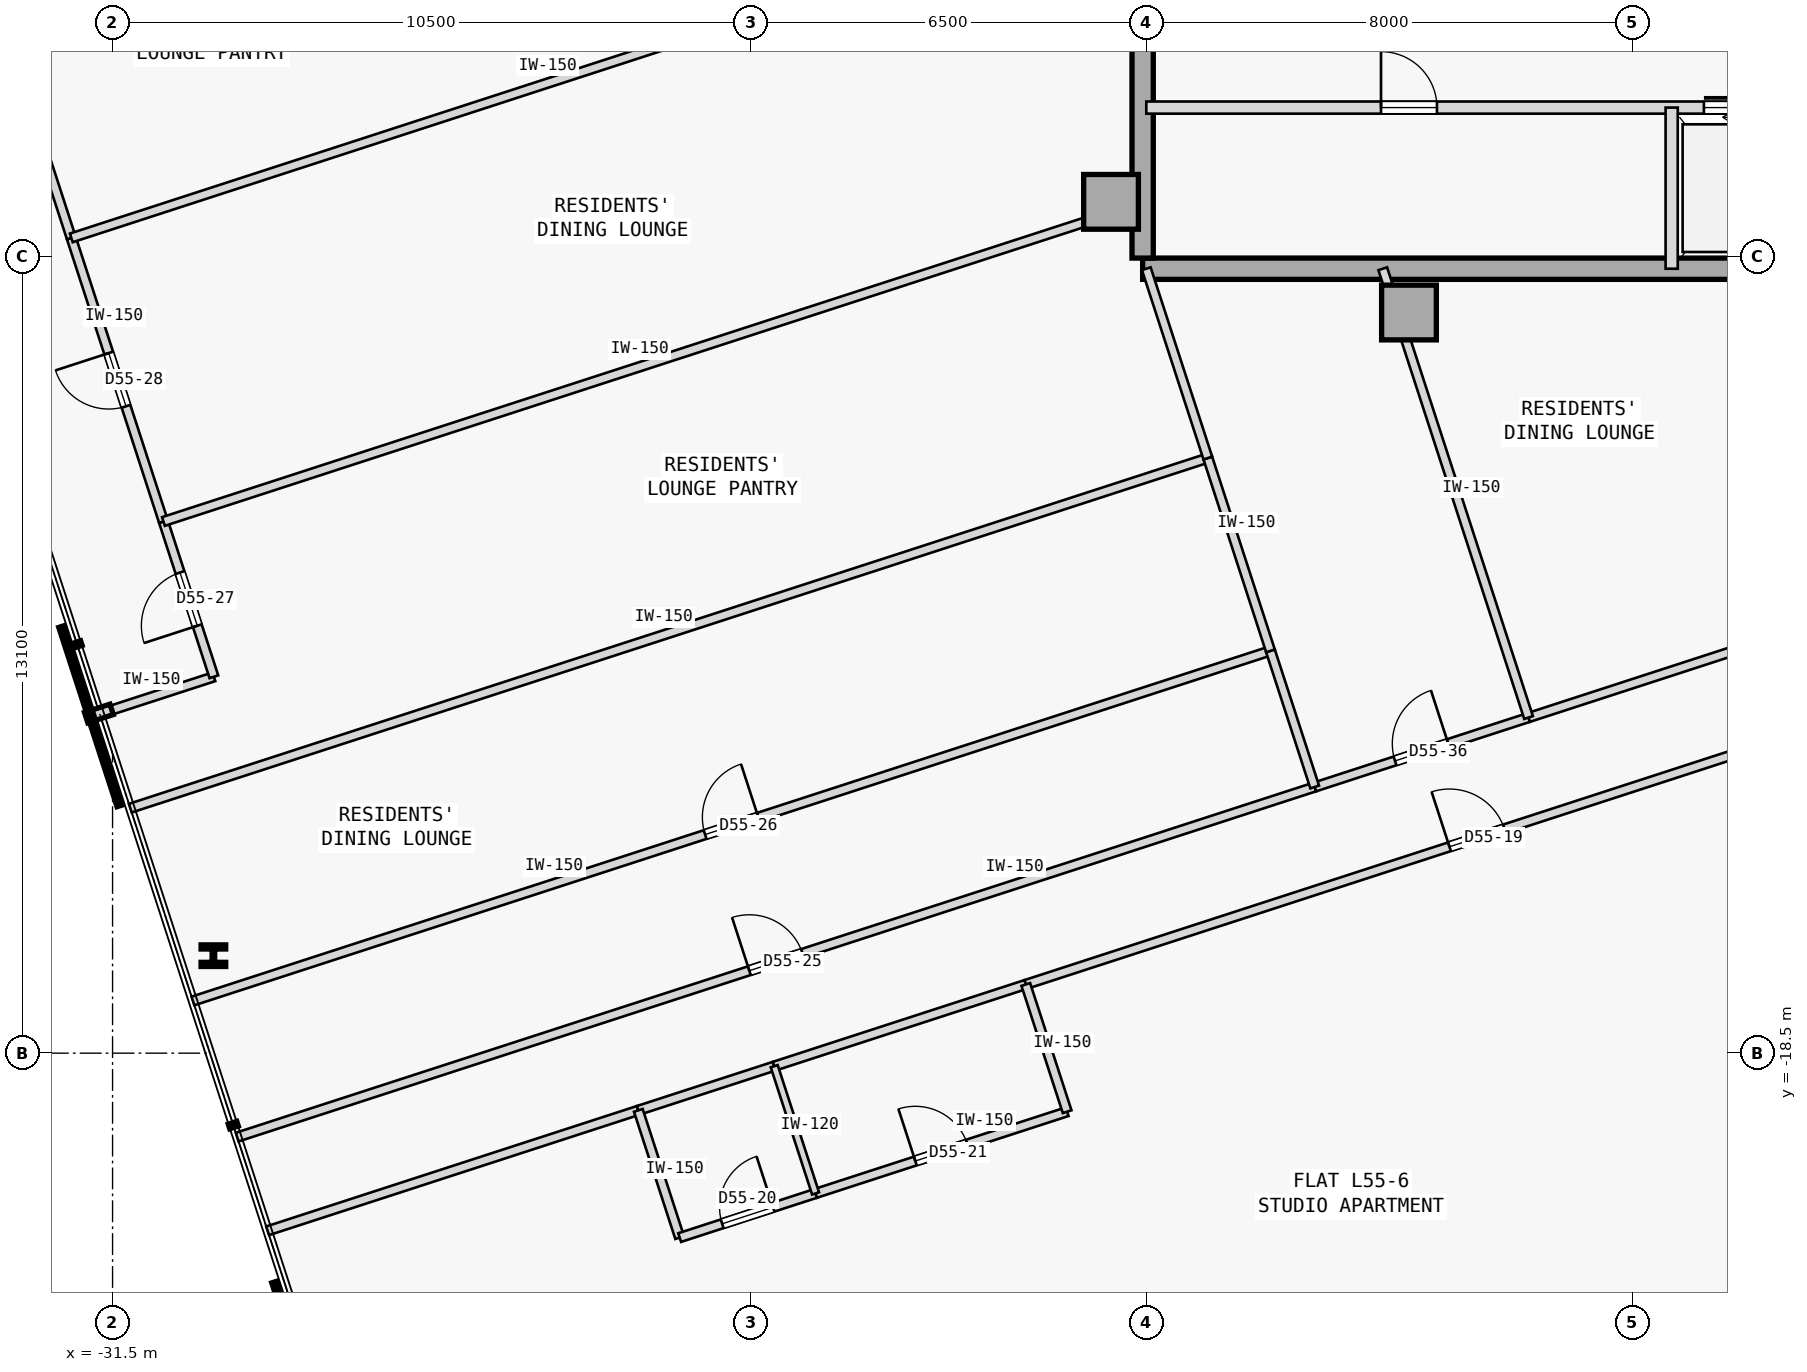
"""IFC4 building model, lengths in metres.
Left out: names, types, materials, properties, quantities, classifications, styles, units other than length and angle.
Written with IfcOpenShell. Run it as: python <this file> out.ifc"""

import sys

from ifc_helpers import new_model, si_unit, direction, frame, frame_2d, origin, origin_2d, place, context, subcontext, project, spatial, rectangle, i_section, extrude, element, fill, save


model = new_model("IFC4")
c1 = context("Model", 3, precision=1e-05, world=origin(), true_north=direction((0.0, 1.0)))
c2 = subcontext(c1, "Body", "Model", "MODEL_VIEW")
j1 = project(units=[si_unit("LENGTHUNIT", "METRE"), si_unit("PLANEANGLEUNIT", "RADIAN")], contexts=[c1])
p1 = place(None, origin())
s1 = spatial("IfcSite", under=j1, at=p1, CompositionType="ELEMENT")
p2 = place(p1, origin())
s2 = spatial("IfcBuilding", under=s1, at=p2, CompositionType="ELEMENT")
p3 = place(p2, frame((0.0, 0.0, 210.9)))
s3 = spatial("IfcBuildingStorey", under=s2, at=p3, CompositionType="ELEMENT", Elevation=210.9)
for number, where, z_axis, x_axis in (
    (1, (-15.08, -4.5, 0.0), (0.0, 0.0, 1.0), (1.0, 0.0, 0.0)),
    (2, (-10.18, -6.32, 0.0), (0.0, 0.0, 1.0), (1.0, 0.0, 0.0)),
):
    element("IfcColumn", number, at=place(p3, frame(where, z_axis=z_axis, x_axis=x_axis)), inside=s3, PredefinedType="COLUMN", context=c2, shape_type="SweptSolid", body=[
        extrude(rectangle(XDim=0.9, YDim=0.9, at=origin_2d()), origin(), (0.0, 0.0, 1.0), 3.35),
    ])
p4 = place(p3, frame((-14.56, -5.6, 0.0), z_axis=(0.0, 0.0, 1.0), x_axis=(1.0, 0.0, 0.0)))
e3 = element("IfcWall", 3, at=p4, inside=s3, PredefinedType="SHEAR", context=c2, shape_type="SweptSolid", body=[
    extrude(rectangle(XDim=10.86, YDim=0.35, at=frame_2d((5.43, 0.0))), origin(), (0.0, 0.0, 1.0), 3.125),
])
p5 = place(p3, frame((-14.56, -5.425, 0.0), z_axis=(0.0, 0.0, 1.0), x_axis=(0.0, 1.0, 0.0)))
e4 = element("IfcWall", 4, at=p5, inside=s3, PredefinedType="SHEAR", context=c2, shape_type="SweptSolid", body=[
    extrude(rectangle(XDim=10.85, YDim=0.35, at=frame_2d((5.425, 0.0))), origin(), (0.0, 0.0, 1.0), 3.125),
])
p6 = place(p3, frame((-29.842, -16.897, 0.0), z_axis=(0.0, 0.0, 1.0), x_axis=(1.0, 0.0, 0.0)))
e5 = element("IfcColumn", 5, at=p6, inside=s3, PredefinedType="COLUMN", context=c2, shape_type="SweptSolid", body=[
    extrude(i_section(OverallWidth=0.405, OverallDepth=0.355, WebThickness=0.042, FlangeThickness=0.068, FilletRadius=0.015, at=origin_2d()), origin(), (0.0, 0.0, 1.0), 3.35),
])
p7 = place(p3, frame((-14.5, -2.95, 0.0), z_axis=(0.0, 0.0, 1.0), x_axis=(1.0, 0.0, 0.0)))
e6 = element("IfcWall", 6, at=p7, inside=s3, PredefinedType="STANDARD", context=c2, shape_type="SweptSolid", body=[
    extrude(rectangle(XDim=10.8, YDim=0.2, at=frame_2d((5.4, 0.0))), origin(), (0.0, 0.0, 1.0), 3.125),
])
p8 = place(p7, frame((9.17, 0.0, 0.0)))
e7 = element("IfcOpeningElement", 7, at=p8, cuts=e6, PredefinedType="OPENING", context=c2, shape_type="SweptSolid", body=[
    extrude(rectangle(XDim=1.1, YDim=2.15, at=frame_2d((0.55, 1.075))), frame((0.0, 0.11, 0.0), z_axis=(0.0, -1.0, 0.0), x_axis=(1.0, 0.0, 0.0)), (0.0, 0.0, 1.0), 0.22),
])
p9 = place(p7, frame((3.86, 0.0, 0.0)))
e8 = element("IfcOpeningElement", 8, at=p9, cuts=e6, PredefinedType="OPENING", context=c2, shape_type="SweptSolid", body=[
    extrude(rectangle(XDim=0.92, YDim=2.15, at=frame_2d((0.46, 1.075))), frame((0.0, 0.11, 0.0), z_axis=(0.0, -1.0, 0.0), x_axis=(1.0, 0.0, 0.0)), (0.0, 0.0, 1.0), 0.22),
])
p10 = place(p3, frame((-5.86, -5.6, 0.0), z_axis=(0.0, 0.0, 1.0), x_axis=(0.0, 1.0, 0.0)))
e9 = element("IfcWall", 9, at=p10, inside=s3, PredefinedType="STANDARD", context=c2, shape_type="SweptSolid", body=[
    extrude(rectangle(XDim=2.65, YDim=0.2, at=frame_2d((1.325, 0.0))), origin(), (0.0, 0.0, 1.0), 3.125),
])
p11 = place(p3, frame((-28.95, -21.421, 0.0), z_axis=(0.0, 0.0, 1.0), x_axis=(0.951048062645, 0.309043010825, 0.0)))
e10 = element("IfcWall", 10, at=p11, inside=s3, PredefinedType="PARTITIONING", context=c2, shape_type="SweptSolid", body=[
    extrude(rectangle(XDim=6.41, YDim=0.15, at=frame_2d((3.205, 0.0))), origin(), (0.0, 0.0, 1.0), 3.125),
])
p12 = place(p3, frame((-16.482, -17.37, 0.0), z_axis=(0.0, 0.0, 1.0), x_axis=(0.9510563751, 0.309017428929, 0.0)))
e11 = element("IfcWall", 11, at=p12, inside=s3, PredefinedType="PARTITIONING", context=c2, shape_type="SweptSolid", body=[
    extrude(rectangle(XDim=15.602, YDim=0.15, at=frame_2d((7.801, 0.0))), origin(), (0.0, 0.0, 1.0), 3.125),
])
p13 = place(p12, frame((7.326, 0.0, 0.0)))
e12 = element("IfcOpeningElement", 12, at=p13, cuts=e11, PredefinedType="OPENING", context=c2, shape_type="SweptSolid", body=[
    extrude(rectangle(XDim=0.95, YDim=2.15, at=frame_2d((0.475, 1.075))), frame((0.0, 0.085, 0.0), z_axis=(0.0, -1.0, 0.0), x_axis=(1.0, 0.0, 0.0)), (0.0, 0.0, 1.0), 0.17),
])
p14 = place(p3, frame((-22.854, -19.44, 0.0), z_axis=(0.0, 0.0, 1.0), x_axis=(0.951076048914, 0.308956872689, 0.0)))
e13 = element("IfcWall", 13, at=p14, inside=s3, PredefinedType="PARTITIONING", context=c2, shape_type="SweptSolid", body=[
    extrude(rectangle(XDim=2.35, YDim=0.15, at=frame_2d((1.175, 0.0))), origin(), (0.0, 0.0, 1.0), 3.125),
])
p15 = place(p3, frame((-20.619, -18.714, 0.0), z_axis=(0.0, 0.0, 1.0), x_axis=(0.951052627573, 0.309028962374, 0.0)))
e14 = element("IfcWall", 14, at=p15, inside=s3, PredefinedType="PARTITIONING", context=c2, shape_type="SweptSolid", body=[
    extrude(rectangle(XDim=4.35, YDim=0.15, at=frame_2d((2.175, 0.0))), origin(), (0.0, 0.0, 1.0), 3.125),
])
p16 = place(p3, frame((-29.45, -19.881, 0.0), z_axis=(0.0, 0.0, 1.0), x_axis=(0.95105650271, 0.309017036186, 0.0)))
e15 = element("IfcWall", 15, at=p16, inside=s3, PredefinedType="PARTITIONING", context=c2, shape_type="SweptSolid", body=[
    extrude(rectangle(XDim=18.632, YDim=0.15, at=frame_2d((9.316, 0.0))), origin(), (0.0, 0.0, 1.0), 3.125),
])
p17 = place(p16, frame((8.856, 0.0, 0.0)))
e16 = element("IfcOpeningElement", 16, at=p17, cuts=e15, PredefinedType="OPENING", context=c2, shape_type="SweptSolid", body=[
    extrude(rectangle(XDim=0.92, YDim=2.15, at=frame_2d((0.46, 1.075))), frame((0.0, 0.085, 0.0), z_axis=(0.0, -1.0, 0.0), x_axis=(1.0, 0.0, 0.0)), (0.0, 0.0, 1.0), 0.17),
])
p18 = place(p3, frame((-31.712, -12.921, 0.0), z_axis=(0.0, 0.0, 1.0), x_axis=(0.951054051148, 0.309024581215, 0.0)))
e17 = element("IfcWall", 17, at=p18, inside=s3, PredefinedType="PARTITIONING", context=c2, shape_type="SweptSolid", body=[
    extrude(rectangle(XDim=1.975, YDim=0.15, at=frame_2d((0.988, 0.0))), origin(), (0.0, 0.0, 1.0), 3.125),
])
p19 = place(p3, frame((-29.833, -12.311, 0.0), z_axis=(0.0, 0.0, 1.0), x_axis=(-0.309044953986, 0.951047431213, 0.0)))
e18 = element("IfcWall", 18, at=p19, inside=s3, PredefinedType="PARTITIONING", context=c2, shape_type="SweptSolid", body=[
    extrude(rectangle(XDim=2.685, YDim=0.15, at=frame_2d((1.343, 0.0))), origin(), (0.0, 0.0, 1.0), 3.125),
])
p20 = place(p19, frame((0.883, 0.0, 0.0)))
e19 = element("IfcOpeningElement", 19, at=p20, cuts=e18, PredefinedType="OPENING", context=c2, shape_type="SweptSolid", body=[
    extrude(rectangle(XDim=0.92, YDim=2.15, at=frame_2d((0.46, 1.075))), frame((0.0, 0.085, 0.0), z_axis=(0.0, -1.0, 0.0), x_axis=(1.0, 0.0, 0.0)), (0.0, 0.0, 1.0), 0.17),
])
p21 = place(p3, frame((-30.663, -9.757, 0.0), z_axis=(0.0, 0.0, 1.0), x_axis=(-0.309019653166, 0.951055652397, 0.0)))
e20 = element("IfcWall", 20, at=p21, inside=s3, PredefinedType="PARTITIONING", context=c2, shape_type="SweptSolid", body=[
    extrude(rectangle(XDim=4.904, YDim=0.15, at=frame_2d((2.452, 0.0))), origin(), (0.0, 0.0, 1.0), 3.125),
])
p22 = place(p21, frame((1.992, 0.0, 0.0)))
e21 = element("IfcOpeningElement", 21, at=p22, cuts=e20, PredefinedType="OPENING", context=c2, shape_type="SweptSolid", body=[
    extrude(rectangle(XDim=0.92, YDim=2.15, at=frame_2d((0.46, 1.075))), frame((0.0, 0.085, 0.0), z_axis=(0.0, -1.0, 0.0), x_axis=(1.0, 0.0, 0.0)), (0.0, 0.0, 1.0), 0.17),
])
p23 = place(p3, frame((-32.179, -5.093, 0.0), z_axis=(0.0, 0.0, 1.0), x_axis=(-0.309014532869, 0.951057316083, 0.0)))
e22 = element("IfcWall", 22, at=p23, inside=s3, PredefinedType="PARTITIONING", context=c2, shape_type="SweptSolid", body=[
    extrude(rectangle(XDim=4.707, YDim=0.15, at=frame_2d((2.354, 0.0))), origin(), (0.0, 0.0, 1.0), 3.125),
])
p24 = place(p3, frame((-11.73, -14.123, 0.0), z_axis=(0.0, 0.0, 1.0), x_axis=(0.951052502763, 0.309029346483, 0.0)))
e23 = element("IfcWall", 23, at=p24, inside=s3, PredefinedType="PARTITIONING", context=c2, shape_type="SweptSolid", body=[
    extrude(rectangle(XDim=3.698, YDim=0.15, at=frame_2d((1.849, 0.0))), origin(), (0.0, 0.0, 1.0), 3.125),
])
p25 = place(p24, frame((1.389, 0.0, 0.0)))
e24 = element("IfcOpeningElement", 24, at=p25, cuts=e23, PredefinedType="OPENING", context=c2, shape_type="SweptSolid", body=[
    extrude(rectangle(XDim=0.92, YDim=2.15, at=frame_2d((0.46, 1.075))), frame((0.0, 0.085, 0.0), z_axis=(0.0, -1.0, 0.0), x_axis=(1.0, 0.0, 0.0)), (0.0, 0.0, 1.0), 0.17),
])
p26 = place(p3, frame((-8.213, -12.98, 0.0), z_axis=(0.0, 0.0, 1.0), x_axis=(0.951058260096, 0.309011627456, 0.0)))
e25 = element("IfcWall", 25, at=p26, inside=s3, PredefinedType="PARTITIONING", context=c2, shape_type="SweptSolid", body=[
    extrude(rectangle(XDim=4.746, YDim=0.15, at=frame_2d((2.373, 0.0))), origin(), (0.0, 0.0, 1.0), 3.125),
])
p27 = place(p3, frame((-22.174, -21.533, 0.0), z_axis=(0.0, 0.0, 1.0), x_axis=(-0.309028364152, 0.951052821956, 0.0)))
e26 = element("IfcWall", 26, at=p27, inside=s3, PredefinedType="PARTITIONING", context=c2, shape_type="SweptSolid", body=[
    extrude(rectangle(XDim=2.2, YDim=0.15, at=frame_2d((1.1, 0.0))), origin(), (0.0, 0.0, 1.0), 3.125),
])
p28 = place(p3, frame((-22.174, -21.533, 0.0), z_axis=(0.0, 0.0, 1.0), x_axis=(0.951045519245, 0.309050837767, 0.0)))
e27 = element("IfcWall", 27, at=p28, inside=s3, PredefinedType="PARTITIONING", context=c2, shape_type="SweptSolid", body=[
    extrude(rectangle(XDim=2.35, YDim=0.15, at=frame_2d((1.175, 0.0))), origin(), (0.0, 0.0, 1.0), 3.125),
])
p29 = place(p28, frame((0.735, 0.0, 0.0)))
e28 = element("IfcOpeningElement", 28, at=p29, cuts=e27, PredefinedType="OPENING", context=c2, shape_type="SweptSolid", body=[
    extrude(rectangle(XDim=0.88, YDim=2.15, at=frame_2d((0.44, 1.075))), frame((0.0, 0.085, 0.0), z_axis=(0.0, -1.0, 0.0), x_axis=(1.0, 0.0, 0.0)), (0.0, 0.0, 1.0), 0.17),
])
p30 = place(p3, frame((-19.939, -20.807, 0.0), z_axis=(0.0, 0.0, 1.0), x_axis=(0.951052627573, 0.309028962374, 0.0)))
e29 = element("IfcWall", 29, at=p30, inside=s3, PredefinedType="PARTITIONING", context=c2, shape_type="SweptSolid", body=[
    extrude(rectangle(XDim=4.35, YDim=0.15, at=frame_2d((2.175, 0.0))), origin(), (0.0, 0.0, 1.0), 3.125),
])
p31 = place(p30, frame((1.725, 0.0, 0.0)))
e30 = element("IfcOpeningElement", 30, at=p31, cuts=e29, PredefinedType="OPENING", context=c2, shape_type="SweptSolid", body=[
    extrude(rectangle(XDim=0.9, YDim=2.15, at=frame_2d((0.45, 1.075))), frame((0.0, 0.085, 0.0), z_axis=(0.0, -1.0, 0.0), x_axis=(1.0, 0.0, 0.0)), (0.0, 0.0, 1.0), 0.17),
])
p32 = place(p3, frame((-15.802, -19.462, 0.0), z_axis=(0.0, 0.0, 1.0), x_axis=(-0.309060979314, 0.951042223598, 0.0)))
e31 = element("IfcWall", 31, at=p32, inside=s3, PredefinedType="PARTITIONING", context=c2, shape_type="SweptSolid", body=[
    extrude(rectangle(XDim=2.2, YDim=0.15, at=frame_2d((1.1, 0.0))), origin(), (0.0, 0.0, 1.0), 3.125),
])
p33 = place(p3, frame((-19.939, -20.807, 0.0), z_axis=(0.0, 0.0, 1.0), x_axis=(-0.309060979314, 0.951042223598, 0.0)))
e32 = element("IfcWall", 32, at=p33, inside=s3, PredefinedType="PARTITIONING", context=c2, shape_type="SweptSolid", body=[
    extrude(rectangle(XDim=2.2, YDim=0.12, at=frame_2d((1.1, 0.0))), origin(), (0.0, 0.0, 1.0), 3.125),
])
p34 = place(p3, frame((-30.178, -17.642, 0.0), z_axis=(0.0, 0.0, 1.0), x_axis=(0.95105650271, 0.309017036186, 0.0)))
e33 = element("IfcWall", 33, at=p34, inside=s3, PredefinedType="PARTITIONING", context=c2, shape_type="SweptSolid", body=[
    extrude(rectangle(XDim=18.632, YDim=0.15, at=frame_2d((9.316, 0.0))), origin(), (0.0, 0.0, 1.0), 3.125),
])
p35 = place(p34, frame((8.856, 0.0, 0.0)))
e34 = element("IfcOpeningElement", 34, at=p35, cuts=e33, PredefinedType="OPENING", context=c2, shape_type="SweptSolid", body=[
    extrude(rectangle(XDim=0.92, YDim=2.15, at=frame_2d((0.46, 1.075))), frame((0.0, 0.085, 0.0), z_axis=(0.0, -1.0, 0.0), x_axis=(1.0, 0.0, 0.0)), (0.0, 0.0, 1.0), 0.17),
])
p36 = place(p3, frame((-11.73, -14.123, 0.0), z_axis=(0.0, 0.0, 1.0), x_axis=(-0.309062621189, 0.951041690035, 0.0)))
e35 = element("IfcWall", 35, at=p36, inside=s3, PredefinedType="PARTITIONING", context=c2, shape_type="SweptSolid", body=[
    extrude(rectangle(XDim=2.354, YDim=0.15, at=frame_2d((1.177, 0.0))), origin(), (0.0, 0.0, 1.0), 3.125),
])
p37 = place(p3, frame((-31.208, -14.471, 0.0), z_axis=(0.0, 0.0, 1.0), x_axis=(0.951057753948, 0.309013185244, 0.0)))
e36 = element("IfcWall", 36, at=p37, inside=s3, PredefinedType="PARTITIONING", context=c2, shape_type="SweptSolid", body=[
    extrude(rectangle(XDim=18.632, YDim=0.15, at=frame_2d((9.316, 0.0))), origin(), (0.0, 0.0, 1.0), 3.125),
])
p38 = place(p3, frame((-12.458, -11.884, 0.0), z_axis=(0.0, 0.0, 1.0), x_axis=(-0.308946982245, 0.951079261766, 0.0)))
e37 = element("IfcWall", 37, at=p38, inside=s3, PredefinedType="PARTITIONING", context=c2, shape_type="SweptSolid", body=[
    extrude(rectangle(XDim=3.334, YDim=0.15, at=frame_2d((1.667, 0.0))), origin(), (0.0, 0.0, 1.0), 3.125),
])
p39 = place(p3, frame((-30.663, -9.757, 0.0), z_axis=(0.0, 0.0, 1.0), x_axis=(0.951058192995, 0.309011833974, 0.0)))
e38 = element("IfcWall", 38, at=p39, inside=s3, PredefinedType="PARTITIONING", context=c2, shape_type="SweptSolid", body=[
    extrude(rectangle(XDim=16.657, YDim=0.15, at=frame_2d((8.329, 0.0))), origin(), (0.0, 0.0, 1.0), 3.125),
])
p40 = place(p3, frame((-13.488, -8.713, 0.0), z_axis=(0.0, 0.0, 1.0), x_axis=(-0.309082700143, 0.951035164687, 0.0)))
e39 = element("IfcWall", 39, at=p40, inside=s3, PredefinedType="PARTITIONING", context=c2, shape_type="SweptSolid", body=[
    extrude(rectangle(XDim=3.274, YDim=0.15, at=frame_2d((1.637, 0.0))), origin(), (0.0, 0.0, 1.0), 3.125),
])
p41 = place(p3, frame((-32.179, -5.093, 0.0), z_axis=(0.0, 0.0, 1.0), x_axis=(0.951053885426, 0.309025091239, 0.0)))
e40 = element("IfcWall", 40, at=p41, inside=s3, PredefinedType="PARTITIONING", context=c2, shape_type="SweptSolid", body=[
    extrude(rectangle(XDim=16.657, YDim=0.15, at=frame_2d((8.329, 0.0))), origin(), (0.0, 0.0, 1.0), 3.125),
])
p42 = place(p3, frame((-8.213, -12.98, 0.0), z_axis=(0.0, 0.0, 1.0), x_axis=(-0.309017065592, 0.951056493155, 0.0)))
e41 = element("IfcWall", 41, at=p42, inside=s3, PredefinedType="PARTITIONING", context=c2, shape_type="SweptSolid", body=[
    extrude(rectangle(XDim=7.76, YDim=0.15, at=frame_2d((3.88, 0.0))), origin(), (0.0, 0.0, 1.0), 3.125),
])
p43 = place(p8, origin())
e42 = element("IfcDoor", 42, at=p43, inside=s3, OperationType="SLIDING_TO_RIGHT", PredefinedType="DOOR", context=c2, shape_type="SweptSolid", body=[
    extrude(rectangle(XDim=1.1, YDim=2.15, at=frame_2d((0.55, 1.075))), frame((0.0, 0.025, 0.0), z_axis=(0.0, -1.0, 0.0), x_axis=(1.0, 0.0, 0.0)), (0.0, 0.0, 1.0), 0.05),
])
fill(e7, e42)
p44 = place(p9, origin())
e43 = element("IfcDoor", 43, at=p44, inside=s3, OperationType="SINGLE_SWING_LEFT", PredefinedType="DOOR", context=c2, shape_type="SweptSolid", body=[
    extrude(rectangle(XDim=0.92, YDim=2.15, at=frame_2d((0.46, 1.075))), frame((0.0, 0.025, 0.0), z_axis=(0.0, -1.0, 0.0), x_axis=(1.0, 0.0, 0.0)), (0.0, 0.0, 1.0), 0.05),
])
fill(e8, e43)
p45 = place(p13, origin())
e44 = element("IfcDoor", 44, at=p45, inside=s3, OperationType="SINGLE_SWING_LEFT", PredefinedType="DOOR", context=c2, shape_type="SweptSolid", body=[
    extrude(rectangle(XDim=0.95, YDim=2.15, at=frame_2d((0.475, 1.075))), frame((0.0, 0.025, 0.0), z_axis=(0.0, -1.0, 0.0), x_axis=(1.0, 0.0, 0.0)), (0.0, 0.0, 1.0), 0.05),
])
fill(e12, e44)
p46 = place(p29, origin())
e45 = element("IfcDoor", 45, at=p46, inside=s3, OperationType="SINGLE_SWING_RIGHT", PredefinedType="DOOR", context=c2, shape_type="SweptSolid", body=[
    extrude(rectangle(XDim=0.88, YDim=2.15, at=frame_2d((0.44, 1.075))), frame((0.0, 0.025, 0.0), z_axis=(0.0, -1.0, 0.0), x_axis=(1.0, 0.0, 0.0)), (0.0, 0.0, 1.0), 0.05),
])
fill(e28, e45)
p47 = place(p31, origin())
e46 = element("IfcDoor", 46, at=p47, inside=s3, OperationType="SINGLE_SWING_LEFT", PredefinedType="DOOR", context=c2, shape_type="SweptSolid", body=[
    extrude(rectangle(XDim=0.9, YDim=2.15, at=frame_2d((0.45, 1.075))), frame((0.0, 0.025, 0.0), z_axis=(0.0, -1.0, 0.0), x_axis=(1.0, 0.0, 0.0)), (0.0, 0.0, 1.0), 0.05),
])
fill(e30, e46)
p48 = place(p17, origin())
e47 = element("IfcDoor", 47, at=p48, inside=s3, OperationType="SINGLE_SWING_LEFT", PredefinedType="DOOR", context=c2, shape_type="SweptSolid", body=[
    extrude(rectangle(XDim=0.92, YDim=2.15, at=frame_2d((0.46, 1.075))), frame((0.0, 0.025, 0.0), z_axis=(0.0, -1.0, 0.0), x_axis=(1.0, 0.0, 0.0)), (0.0, 0.0, 1.0), 0.05),
])
fill(e16, e47)
p49 = place(p35, origin())
e48 = element("IfcDoor", 48, at=p49, inside=s3, OperationType="SINGLE_SWING_RIGHT", PredefinedType="DOOR", context=c2, shape_type="SweptSolid", body=[
    extrude(rectangle(XDim=0.92, YDim=2.15, at=frame_2d((0.46, 1.075))), frame((0.0, 0.025, 0.0), z_axis=(0.0, -1.0, 0.0), x_axis=(1.0, 0.0, 0.0)), (0.0, 0.0, 1.0), 0.05),
])
fill(e34, e48)
p50 = place(p20, origin())
e49 = element("IfcDoor", 49, at=p50, inside=s3, OperationType="SINGLE_SWING_LEFT", PredefinedType="DOOR", context=c2, shape_type="SweptSolid", body=[
    extrude(rectangle(XDim=0.92, YDim=2.15, at=frame_2d((0.46, 1.075))), frame((0.0, 0.025, 0.0), z_axis=(0.0, -1.0, 0.0), x_axis=(1.0, 0.0, 0.0)), (0.0, 0.0, 1.0), 0.05),
])
fill(e19, e49)
p51 = place(p22, origin())
e50 = element("IfcDoor", 50, at=p51, inside=s3, OperationType="SINGLE_SWING_RIGHT", PredefinedType="DOOR", context=c2, shape_type="SweptSolid", body=[
    extrude(rectangle(XDim=0.92, YDim=2.15, at=frame_2d((0.46, 1.075))), frame((0.0, 0.025, 0.0), z_axis=(0.0, -1.0, 0.0), x_axis=(1.0, 0.0, 0.0)), (0.0, 0.0, 1.0), 0.05),
])
fill(e21, e50)
p52 = place(p25, origin())
e51 = element("IfcDoor", 51, at=p52, inside=s3, OperationType="SINGLE_SWING_RIGHT", PredefinedType="DOOR", context=c2, shape_type="SweptSolid", body=[
    extrude(rectangle(XDim=0.92, YDim=2.15, at=frame_2d((0.46, 1.075))), frame((0.0, 0.025, 0.0), z_axis=(0.0, -1.0, 0.0), x_axis=(1.0, 0.0, 0.0)), (0.0, 0.0, 1.0), 0.05),
])
fill(e24, e51)
save(model, sys.argv[1])
